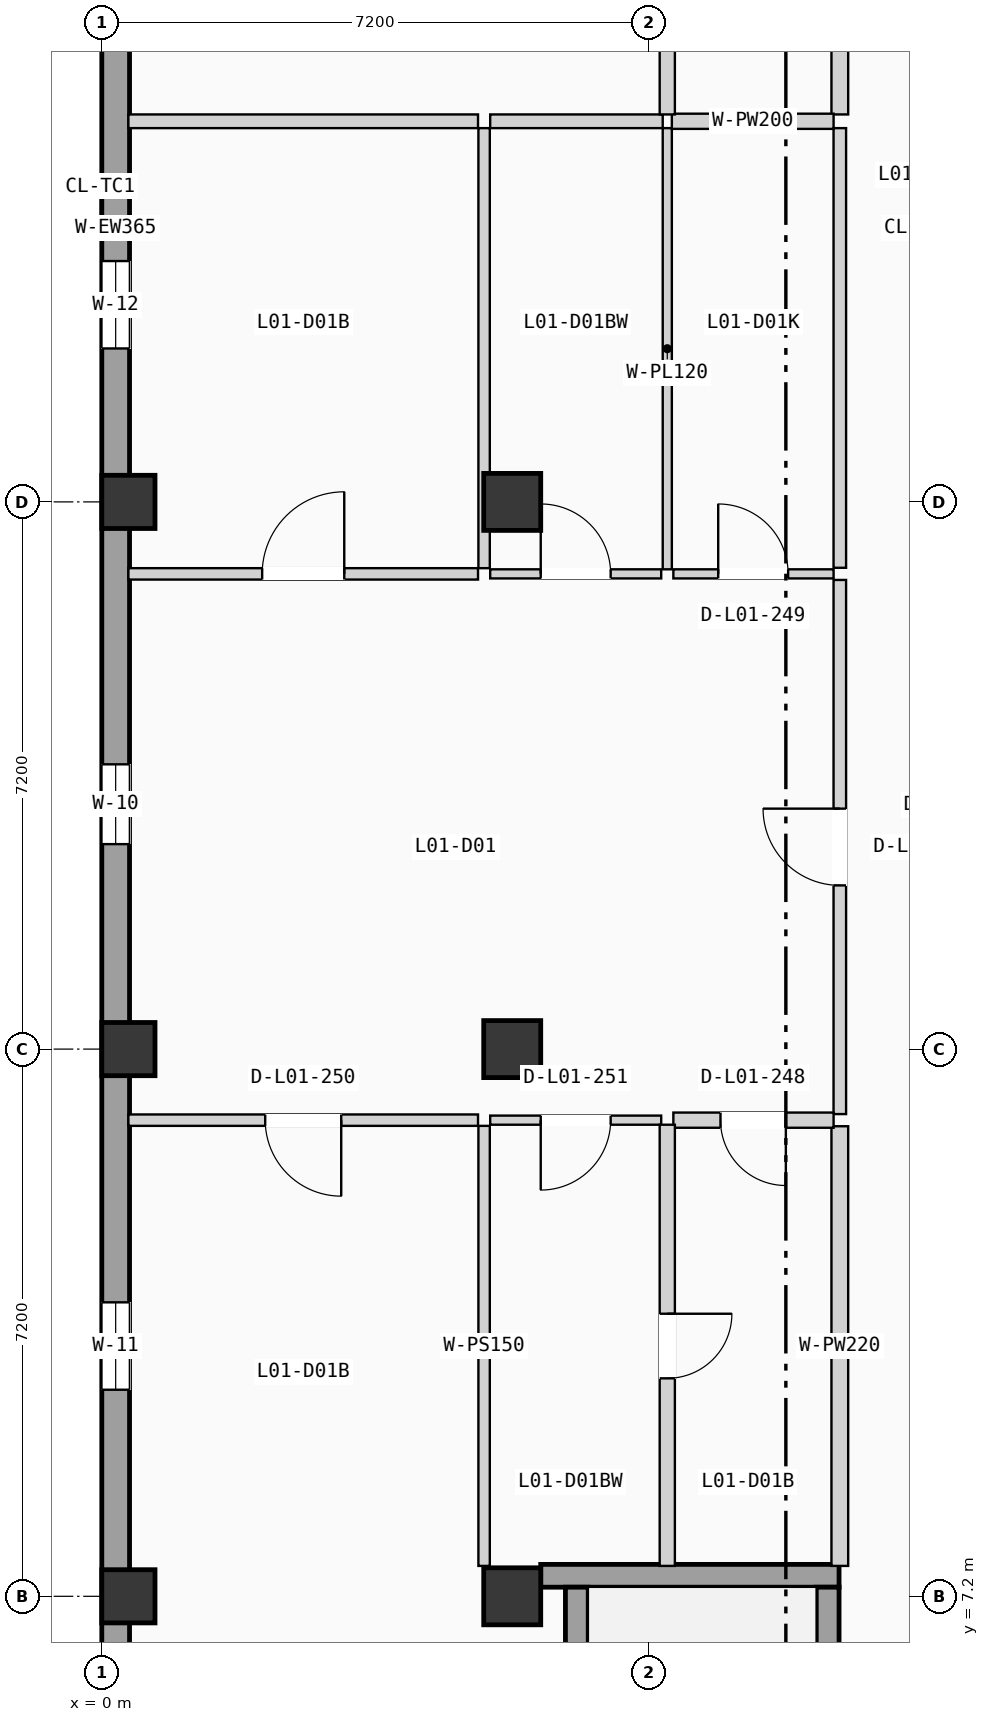
"""IFC4 building model, lengths in metres.
Left out: names, types, materials, properties, quantities, classifications, styles, units other than length and angle.
Written with IfcOpenShell. Run it as: python <this file> out.ifc"""

import sys

from ifc_helpers import new_model, si_unit, direction, frame, frame_2d, origin, origin_2d, place, context, subcontext, project, spatial, rectangle, extrude, element, fill, save


model = new_model("IFC4")
c1 = context("Model", 3, precision=1e-05, world=origin(), true_north=direction((0.0, 1.0)))
c2 = subcontext(c1, "Body", "Model", "MODEL_VIEW")
j1 = project(units=[si_unit("LENGTHUNIT", "METRE"), si_unit("PLANEANGLEUNIT", "RADIAN")], contexts=[c1])
p1 = place(None, origin())
s1 = spatial("IfcSite", under=j1, at=p1, CompositionType="ELEMENT")
p2 = place(p1, origin())
s2 = spatial("IfcBuilding", under=s1, at=p2, CompositionType="ELEMENT")
p3 = place(p2, frame((0.0, 0.0, 4.9)))
s3 = spatial("IfcBuildingStorey", under=s2, at=p3, CompositionType="ELEMENT", Elevation=4.9)
for number, where, z_axis, x_axis in (
    (1, (0.35, 7.2, 0.0), (0.0, 0.0, 1.0), (1.0, 0.0, 0.0)),
    (2, (0.35, 14.4, 0.0), (0.0, 0.0, 1.0), (1.0, 0.0, 0.0)),
    (3, (0.35, 21.6, 0.0), (0.0, 0.0, 1.0), (1.0, 0.0, 0.0)),
):
    element("IfcColumn", number, at=place(p3, frame(where, z_axis=z_axis, x_axis=x_axis)), inside=s3, PredefinedType="COLUMN", context=c2, shape_type="SweptSolid", body=[
        extrude(rectangle(XDim=0.7, YDim=0.7, at=origin_2d()), origin(), (0.0, 0.0, 1.0), 3.675),
    ])
for number, where, z_axis, x_axis in (
    (4, (5.4, 7.2, 0.0), (0.0, 0.0, 1.0), (1.0, 0.0, 0.0)),
    (5, (5.4, 14.4, 0.0), (0.0, 0.0, 1.0), (1.0, 0.0, 0.0)),
    (6, (5.4, 21.6, 0.0), (0.0, 0.0, 1.0), (1.0, 0.0, 0.0)),
):
    element("IfcColumn", number, at=place(p3, frame(where, z_axis=z_axis, x_axis=x_axis)), inside=s3, PredefinedType="COLUMN", context=c2, shape_type="SweptSolid", body=[
        extrude(rectangle(XDim=0.75, YDim=0.75, at=origin_2d()), origin(), (0.0, 0.0, 1.0), 3.675),
    ])
p4 = place(p3, frame((0.183, 0.365, 0.0), z_axis=(0.0, 0.0, 1.0), x_axis=(0.0, 1.0, 0.0)))
e7 = element("IfcWall", 7, at=p4, inside=s3, PredefinedType="SOLIDWALL", context=c2, shape_type="SweptSolid", body=[
    extrude(rectangle(XDim=49.67, YDim=0.365, at=frame_2d((24.835, 0.0))), origin(), (0.0, 0.0, 1.0), 3.415),
])
p5 = place(p4, frame((16.732, 0.0, 0.9)))
e8 = element("IfcOpeningElement", 8, at=p5, cuts=e7, PredefinedType="OPENING", context=c2, shape_type="SweptSolid", body=[
    extrude(rectangle(XDim=1.05, YDim=1.8, at=frame_2d((0.525, 0.9))), frame((0.0, 0.192, 0.0), z_axis=(0.0, -1.0, 0.0), x_axis=(1.0, 0.0, 0.0)), (0.0, 0.0, 1.0), 0.385),
])
p6 = place(p4, frame((9.553, 0.0, 0.9)))
e9 = element("IfcOpeningElement", 9, at=p6, cuts=e7, PredefinedType="OPENING", context=c2, shape_type="SweptSolid", body=[
    extrude(rectangle(XDim=1.15, YDim=1.2, at=frame_2d((0.575, 0.6))), frame((0.0, 0.192, 0.0), z_axis=(0.0, -1.0, 0.0), x_axis=(1.0, 0.0, 0.0)), (0.0, 0.0, 1.0), 0.385),
])
p7 = place(p4, frame((23.254, 0.0, 0.9)))
e10 = element("IfcOpeningElement", 10, at=p7, cuts=e7, PredefinedType="OPENING", context=c2, shape_type="SweptSolid", body=[
    extrude(rectangle(XDim=1.15, YDim=1.35, at=frame_2d((0.575, 0.675))), frame((0.0, 0.192, 0.0), z_axis=(0.0, -1.0, 0.0), x_axis=(1.0, 0.0, 0.0)), (0.0, 0.0, 1.0), 0.385),
])
p8 = place(p4, frame((32.81, 0.0, 0.9)))
e11 = element("IfcOpeningElement", 11, at=p8, cuts=e7, PredefinedType="OPENING", context=c2, shape_type="SweptSolid", body=[
    extrude(rectangle(XDim=1.15, YDim=1.5, at=frame_2d((0.575, 0.75))), frame((0.0, 0.192, 0.0), z_axis=(0.0, -1.0, 0.0), x_axis=(1.0, 0.0, 0.0)), (0.0, 0.0, 1.0), 0.385),
])
p9 = place(p4, frame((29.4, 0.0, 0.9)))
e12 = element("IfcOpeningElement", 12, at=p9, cuts=e7, PredefinedType="OPENING", context=c2, shape_type="SweptSolid", body=[
    extrude(rectangle(XDim=1.15, YDim=1.65, at=frame_2d((0.575, 0.825))), frame((0.0, 0.192, 0.0), z_axis=(0.0, -1.0, 0.0), x_axis=(1.0, 0.0, 0.0)), (0.0, 0.0, 1.0), 0.385),
])
p10 = place(p4, frame((39.404, 0.0, 0.9)))
e13 = element("IfcOpeningElement", 13, at=p10, cuts=e7, PredefinedType="OPENING", context=c2, shape_type="SweptSolid", body=[
    extrude(rectangle(XDim=1.15, YDim=1.8, at=frame_2d((0.575, 0.9))), frame((0.0, 0.192, 0.0), z_axis=(0.0, -1.0, 0.0), x_axis=(1.0, 0.0, 0.0)), (0.0, 0.0, 1.0), 0.385),
])
p11 = place(p3, frame((5.775, 7.47, 0.0), z_axis=(0.0, 0.0, 1.0), x_axis=(1.0, 0.0, 0.0)))
e14 = element("IfcWall", 14, at=p11, inside=s3, PredefinedType="SHEAR", context=c2, shape_type="SweptSolid", body=[
    extrude(rectangle(XDim=3.925, YDim=0.3, at=frame_2d((1.962, 0.0))), origin(), (0.0, 0.0, 1.0), 3.415),
])
p12 = place(p3, frame((6.25, 0.32, 0.0), z_axis=(0.0, 0.0, 1.0), x_axis=(0.0, 1.0, 0.0)))
e15 = element("IfcWall", 15, at=p12, inside=s3, PredefinedType="SHEAR", context=c2, shape_type="SweptSolid", body=[
    extrude(rectangle(XDim=7.0, YDim=0.3, at=frame_2d((3.5, 0.0))), origin(), (0.0, 0.0, 1.0), 3.415),
])
p13 = place(p3, frame((9.55, 0.32, 0.0), z_axis=(0.0, 0.0, 1.0), x_axis=(0.0, 1.0, 0.0)))
e16 = element("IfcWall", 16, at=p13, inside=s3, PredefinedType="SHEAR", context=c2, shape_type="SweptSolid", body=[
    extrude(rectangle(XDim=7.0, YDim=0.3, at=frame_2d((3.5, 0.0))), origin(), (0.0, 0.0, 1.0), 3.415),
])
p14 = place(p13, frame((0.225, 0.0, 0.0)))
e17 = element("IfcOpeningElement", 17, at=p14, cuts=e16, PredefinedType="OPENING", context=c2, shape_type="SweptSolid", body=[
    extrude(rectangle(XDim=1.15, YDim=2.12, at=frame_2d((0.575, 1.06))), frame((0.0, 0.16, 0.0), z_axis=(0.0, -1.0, 0.0), x_axis=(1.0, 0.0, 0.0)), (0.0, 0.0, 1.0), 0.32),
])
p15 = place(p3, frame((9.71, 13.545, 0.0), z_axis=(0.0, 0.0, 1.0), x_axis=(0.0, 1.0, 0.0)))
e18 = element("IfcWall", 18, at=p15, inside=s3, PredefinedType="PARTITIONING", context=c2, shape_type="SweptSolid", body=[
    extrude(rectangle(XDim=7.028, YDim=0.165, at=frame_2d((3.514, 0.0))), origin(), (0.0, 0.0, 1.0), 3.395),
])
p16 = place(p15, frame((3.009, 0.0, 0.0)))
e19 = element("IfcOpeningElement", 19, at=p16, cuts=e18, PredefinedType="OPENING", context=c2, shape_type="SweptSolid", body=[
    extrude(rectangle(XDim=1.01, YDim=2.11, at=frame_2d((0.505, 1.055))), frame((0.0, 0.093, 0.0), z_axis=(0.0, -1.0, 0.0), x_axis=(1.0, 0.0, 0.0)), (0.0, 0.0, 1.0), 0.185),
])
p17 = place(p3, frame((9.71, 7.6, 0.0), z_axis=(0.0, 0.0, 1.0), x_axis=(0.0, 1.0, 0.0)))
e20 = element("IfcWall", 20, at=p17, inside=s3, PredefinedType="PLUMBINGWALL", context=c2, shape_type="SweptSolid", body=[
    extrude(rectangle(XDim=5.785, YDim=0.22, at=frame_2d((2.893, 0.0))), origin(), (0.0, 0.0, 1.0), 3.395),
])
p18 = place(p3, frame((9.71, 20.733, 0.0), z_axis=(0.0, 0.0, 1.0), x_axis=(0.0, 1.0, 0.0)))
e21 = element("IfcWall", 21, at=p18, inside=s3, PredefinedType="PARTITIONING", context=c2, shape_type="SweptSolid", body=[
    extrude(rectangle(XDim=5.785, YDim=0.165, at=frame_2d((2.893, 0.0))), origin(), (0.0, 0.0, 1.0), 3.395),
])
p19 = place(p3, frame((9.71, 26.698, 0.0), z_axis=(0.0, 0.0, 1.0), x_axis=(0.0, 1.0, 0.0)))
e22 = element("IfcWall", 22, at=p19, inside=s3, PredefinedType="PLUMBINGWALL", context=c2, shape_type="SweptSolid", body=[
    extrude(rectangle(XDim=4.912, YDim=0.22, at=frame_2d((2.456, 0.0))), origin(), (0.0, 0.0, 1.0), 3.395),
])
p20 = place(p3, frame((7.52, 13.465, 0.0), z_axis=(0.0, 0.0, 1.0), x_axis=(1.0, 0.0, 0.0)))
e23 = element("IfcWall", 23, at=p20, inside=s3, PredefinedType="PLUMBINGWALL", context=c2, shape_type="SweptSolid", body=[
    extrude(rectangle(XDim=2.108, YDim=0.2, at=frame_2d((1.054, 0.0))), origin(), (0.0, 0.0, 1.0), 3.395),
])
p21 = place(p20, frame((0.62, 0.0, 0.0)))
e24 = element("IfcOpeningElement", 24, at=p21, cuts=e23, PredefinedType="OPENING", context=c2, shape_type="SweptSolid", body=[
    extrude(rectangle(XDim=0.86, YDim=2.0, at=frame_2d((0.43, 1.0))), frame((0.0, 0.11, 0.0), z_axis=(0.0, -1.0, 0.0), x_axis=(1.0, 0.0, 0.0)), (0.0, 0.0, 1.0), 0.22),
])
p22 = place(p3, frame((7.52, 20.653, 0.0), z_axis=(0.0, 0.0, 1.0), x_axis=(1.0, 0.0, 0.0)))
e25 = element("IfcWall", 25, at=p22, inside=s3, PredefinedType="PARTITIONING", context=c2, shape_type="SweptSolid", body=[
    extrude(rectangle(XDim=2.108, YDim=0.12, at=frame_2d((1.054, 0.0))), origin(), (0.0, 0.0, 1.0), 3.395),
])
p23 = place(p22, frame((0.59, 0.0, 0.0)))
e26 = element("IfcOpeningElement", 26, at=p23, cuts=e25, PredefinedType="OPENING", context=c2, shape_type="SweptSolid", body=[
    extrude(rectangle(XDim=0.92, YDim=2.02, at=frame_2d((0.46, 1.01))), frame((0.0, 0.07, 0.0), z_axis=(0.0, -1.0, 0.0), x_axis=(1.0, 0.0, 0.0)), (0.0, 0.0, 1.0), 0.14),
])
p24 = place(p3, frame((0.35, 13.465, 0.0), z_axis=(0.0, 0.0, 1.0), x_axis=(1.0, 0.0, 0.0)))
e27 = element("IfcWall", 27, at=p24, inside=s3, PredefinedType="PARTITIONING", context=c2, shape_type="SweptSolid", body=[
    extrude(rectangle(XDim=4.6, YDim=0.15, at=frame_2d((2.3, 0.0))), origin(), (0.0, 0.0, 1.0), 3.395),
])
p25 = place(p24, frame((1.8, 0.0, 0.0)))
e28 = element("IfcOpeningElement", 28, at=p25, cuts=e27, PredefinedType="OPENING", context=c2, shape_type="SweptSolid", body=[
    extrude(rectangle(XDim=1.0, YDim=2.06, at=frame_2d((0.5, 1.03))), frame((0.0, 0.085, 0.0), z_axis=(0.0, -1.0, 0.0), x_axis=(1.0, 0.0, 0.0)), (0.0, 0.0, 1.0), 0.17),
])
p26 = place(p3, frame((5.11, 13.465, 0.0), z_axis=(0.0, 0.0, 1.0), x_axis=(1.0, 0.0, 0.0)))
e29 = element("IfcWall", 29, at=p26, inside=s3, PredefinedType="PARTITIONING", context=c2, shape_type="SweptSolid", body=[
    extrude(rectangle(XDim=2.25, YDim=0.12, at=frame_2d((1.125, 0.0))), origin(), (0.0, 0.0, 1.0), 3.395),
])
p27 = place(p26, frame((0.665, 0.0, 0.0)))
e30 = element("IfcOpeningElement", 30, at=p27, cuts=e29, PredefinedType="OPENING", context=c2, shape_type="SweptSolid", body=[
    extrude(rectangle(XDim=0.92, YDim=2.02, at=frame_2d((0.46, 1.01))), frame((0.0, 0.07, 0.0), z_axis=(0.0, -1.0, 0.0), x_axis=(1.0, 0.0, 0.0)), (0.0, 0.0, 1.0), 0.14),
])
p28 = place(p3, frame((0.35, 20.653, 0.0), z_axis=(0.0, 0.0, 1.0), x_axis=(1.0, 0.0, 0.0)))
e31 = element("IfcWall", 31, at=p28, inside=s3, PredefinedType="PARTITIONING", context=c2, shape_type="SweptSolid", body=[
    extrude(rectangle(XDim=4.6, YDim=0.15, at=frame_2d((2.3, 0.0))), origin(), (0.0, 0.0, 1.0), 3.395),
])
p29 = place(p28, frame((1.76, 0.0, 0.0)))
e32 = element("IfcOpeningElement", 32, at=p29, cuts=e31, PredefinedType="OPENING", context=c2, shape_type="SweptSolid", body=[
    extrude(rectangle(XDim=1.08, YDim=2.1, at=frame_2d((0.54, 1.05))), frame((0.0, 0.085, 0.0), z_axis=(0.0, -1.0, 0.0), x_axis=(1.0, 0.0, 0.0)), (0.0, 0.0, 1.0), 0.17),
])
p30 = place(p3, frame((5.11, 20.653, 0.0), z_axis=(0.0, 0.0, 1.0), x_axis=(1.0, 0.0, 0.0)))
e33 = element("IfcWall", 33, at=p30, inside=s3, PredefinedType="PARTITIONING", context=c2, shape_type="SweptSolid", body=[
    extrude(rectangle(XDim=2.25, YDim=0.12, at=frame_2d((1.125, 0.0))), origin(), (0.0, 0.0, 1.0), 3.395),
])
p31 = place(p30, frame((0.665, 0.0, 0.0)))
e34 = element("IfcOpeningElement", 34, at=p31, cuts=e33, PredefinedType="OPENING", context=c2, shape_type="SweptSolid", body=[
    extrude(rectangle(XDim=0.92, YDim=2.02, at=frame_2d((0.46, 1.01))), frame((0.0, 0.07, 0.0), z_axis=(0.0, -1.0, 0.0), x_axis=(1.0, 0.0, 0.0)), (0.0, 0.0, 1.0), 0.14),
])
p32 = place(p3, frame((7.44, 7.6, 0.0), z_axis=(0.0, 0.0, 1.0), x_axis=(0.0, 1.0, 0.0)))
e35 = element("IfcWall", 35, at=p32, inside=s3, PredefinedType="PLUMBINGWALL", context=c2, shape_type="SweptSolid", body=[
    extrude(rectangle(XDim=5.805, YDim=0.2, at=frame_2d((2.902, 0.0))), origin(), (0.0, 0.0, 1.0), 3.395),
])
p33 = place(p32, frame((2.468, 0.0, 0.0)))
e36 = element("IfcOpeningElement", 36, at=p33, cuts=e35, PredefinedType="OPENING", context=c2, shape_type="SweptSolid", body=[
    extrude(rectangle(XDim=0.85, YDim=2.01, at=frame_2d((0.425, 1.005))), frame((0.0, 0.11, 0.0), z_axis=(0.0, -1.0, 0.0), x_axis=(1.0, 0.0, 0.0)), (0.0, 0.0, 1.0), 0.22),
])
p34 = place(p3, frame((7.44, 20.713, 0.0), z_axis=(0.0, 0.0, 1.0), x_axis=(0.0, 1.0, 0.0)))
e37 = element("IfcWall", 37, at=p34, inside=s3, PredefinedType="PARTITIONING", context=c2, shape_type="SweptSolid", body=[
    extrude(rectangle(XDim=5.805, YDim=0.12, at=frame_2d((2.903, 0.0))), origin(), (0.0, 0.0, 1.0), 3.395),
])
p35 = place(p3, frame((7.5, 26.608, 0.0), z_axis=(0.0, 0.0, 1.0), x_axis=(1.0, 0.0, 0.0)))
e38 = element("IfcWall", 38, at=p35, inside=s3, PredefinedType="PLUMBINGWALL", context=c2, shape_type="SweptSolid", body=[
    extrude(rectangle(XDim=2.128, YDim=0.2, at=frame_2d((1.064, 0.0))), origin(), (0.0, 0.0, 1.0), 3.395),
])
p36 = place(p3, frame((5.03, 7.6, 0.0), z_axis=(0.0, 0.0, 1.0), x_axis=(0.0, 1.0, 0.0)))
e39 = element("IfcWall", 39, at=p36, inside=s3, PredefinedType="PARTITIONING", context=c2, shape_type="SweptSolid", body=[
    extrude(rectangle(XDim=5.79, YDim=0.15, at=frame_2d((2.895, 0.0))), origin(), (0.0, 0.0, 1.0), 3.395),
])
p37 = place(p3, frame((5.03, 20.728, 0.0), z_axis=(0.0, 0.0, 1.0), x_axis=(0.0, 1.0, 0.0)))
e40 = element("IfcWall", 40, at=p37, inside=s3, PredefinedType="PARTITIONING", context=c2, shape_type="SweptSolid", body=[
    extrude(rectangle(XDim=5.79, YDim=0.15, at=frame_2d((2.895, 0.0))), origin(), (0.0, 0.0, 1.0), 3.395),
])
p38 = place(p3, frame((0.35, 26.608, 0.0), z_axis=(0.0, 0.0, 1.0), x_axis=(1.0, 0.0, 0.0)))
e41 = element("IfcWall", 41, at=p38, inside=s3, PredefinedType="PARTITIONING", context=c2, shape_type="SweptSolid", body=[
    extrude(rectangle(XDim=4.6, YDim=0.18, at=frame_2d((2.3, 0.0))), origin(), (0.0, 0.0, 1.0), 3.395),
])
p39 = place(p3, frame((5.11, 26.608, 0.0), z_axis=(0.0, 0.0, 1.0), x_axis=(1.0, 0.0, 0.0)))
e42 = element("IfcWall", 42, at=p39, inside=s3, PredefinedType="PARTITIONING", context=c2, shape_type="SweptSolid", body=[
    extrude(rectangle(XDim=2.27, YDim=0.18, at=frame_2d((1.135, 0.0))), origin(), (0.0, 0.0, 1.0), 3.395),
])
p40 = place(p3, frame((7.44, 26.698, 0.0), z_axis=(0.0, 0.0, 1.0), x_axis=(0.0, 1.0, 0.0)))
e43 = element("IfcWall", 43, at=p40, inside=s3, PredefinedType="PLUMBINGWALL", context=c2, shape_type="SweptSolid", body=[
    extrude(rectangle(XDim=4.917, YDim=0.2, at=frame_2d((2.458, 0.0))), origin(), (0.0, 0.0, 1.0), 3.395),
])
p41 = place(p5, origin())
e44 = element("IfcWindow", 44, at=p41, inside=s3, PartitioningType="SINGLE_PANEL", PredefinedType="WINDOW", context=c2, shape_type="SweptSolid", body=[
    extrude(rectangle(XDim=1.05, YDim=1.8, at=frame_2d((0.525, 0.9))), frame((0.0, 0.03, 0.0), z_axis=(0.0, -1.0, 0.0), x_axis=(1.0, 0.0, 0.0)), (0.0, 0.0, 1.0), 0.06),
])
fill(e8, e44)
p42 = place(p6, origin())
e45 = element("IfcWindow", 45, at=p42, inside=s3, PartitioningType="SINGLE_PANEL", PredefinedType="WINDOW", context=c2, shape_type="SweptSolid", body=[
    extrude(rectangle(XDim=1.15, YDim=1.2, at=frame_2d((0.575, 0.6))), frame((0.0, 0.03, 0.0), z_axis=(0.0, -1.0, 0.0), x_axis=(1.0, 0.0, 0.0)), (0.0, 0.0, 1.0), 0.06),
])
fill(e9, e45)
p43 = place(p7, origin())
e46 = element("IfcWindow", 46, at=p43, inside=s3, PartitioningType="SINGLE_PANEL", PredefinedType="WINDOW", context=c2, shape_type="SweptSolid", body=[
    extrude(rectangle(XDim=1.15, YDim=1.35, at=frame_2d((0.575, 0.675))), frame((0.0, 0.03, 0.0), z_axis=(0.0, -1.0, 0.0), x_axis=(1.0, 0.0, 0.0)), (0.0, 0.0, 1.0), 0.06),
])
fill(e10, e46)
p44 = place(p16, origin())
e47 = element("IfcDoor", 47, at=p44, inside=s3, OperationType="SINGLE_SWING_RIGHT", PredefinedType="DOOR", context=c2, shape_type="SweptSolid", body=[
    extrude(rectangle(XDim=1.01, YDim=2.11, at=frame_2d((0.505, 1.055))), frame((0.0, 0.025, 0.0), z_axis=(0.0, -1.0, 0.0), x_axis=(1.0, 0.0, 0.0)), (0.0, 0.0, 1.0), 0.05),
])
fill(e19, e47)
p45 = place(p21, frame((0.86, 0.0, 0.0), z_axis=(0.0, 0.0, 1.0), x_axis=(-1.0, 0.0, 0.0)))
e48 = element("IfcDoor", 48, at=p45, inside=s3, OperationType="SINGLE_SWING_RIGHT", PredefinedType="DOOR", context=c2, shape_type="SweptSolid", body=[
    extrude(rectangle(XDim=0.86, YDim=2.0, at=frame_2d((0.43, 1.0))), frame((0.0, 0.025, 0.0), z_axis=(0.0, -1.0, 0.0), x_axis=(1.0, 0.0, 0.0)), (0.0, 0.0, 1.0), 0.05),
])
fill(e24, e48)
p46 = place(p23, origin())
e49 = element("IfcDoor", 49, at=p46, inside=s3, OperationType="SINGLE_SWING_LEFT", PredefinedType="DOOR", context=c2, shape_type="SweptSolid", body=[
    extrude(rectangle(XDim=0.92, YDim=2.02, at=frame_2d((0.46, 1.01))), frame((0.0, 0.025, 0.0), z_axis=(0.0, -1.0, 0.0), x_axis=(1.0, 0.0, 0.0)), (0.0, 0.0, 1.0), 0.05),
])
fill(e26, e49)
p47 = place(p25, frame((1.0, 0.0, 0.0), z_axis=(0.0, 0.0, 1.0), x_axis=(-1.0, 0.0, 0.0)))
e50 = element("IfcDoor", 50, at=p47, inside=s3, OperationType="SINGLE_SWING_RIGHT", PredefinedType="DOOR", context=c2, shape_type="SweptSolid", body=[
    extrude(rectangle(XDim=1.0, YDim=2.06, at=frame_2d((0.5, 1.03))), frame((0.0, 0.025, 0.0), z_axis=(0.0, -1.0, 0.0), x_axis=(1.0, 0.0, 0.0)), (0.0, 0.0, 1.0), 0.05),
])
fill(e28, e50)
p48 = place(p27, frame((0.92, 0.0, 0.0), z_axis=(0.0, 0.0, 1.0), x_axis=(-1.0, 0.0, 0.0)))
e51 = element("IfcDoor", 51, at=p48, inside=s3, OperationType="SINGLE_SWING_LEFT", PredefinedType="DOOR", context=c2, shape_type="SweptSolid", body=[
    extrude(rectangle(XDim=0.92, YDim=2.02, at=frame_2d((0.46, 1.01))), frame((0.0, 0.025, 0.0), z_axis=(0.0, -1.0, 0.0), x_axis=(1.0, 0.0, 0.0)), (0.0, 0.0, 1.0), 0.05),
])
fill(e30, e51)
p49 = place(p29, origin())
e52 = element("IfcDoor", 52, at=p49, inside=s3, OperationType="SINGLE_SWING_RIGHT", PredefinedType="DOOR", context=c2, shape_type="SweptSolid", body=[
    extrude(rectangle(XDim=1.08, YDim=2.1, at=frame_2d((0.54, 1.05))), frame((0.0, 0.025, 0.0), z_axis=(0.0, -1.0, 0.0), x_axis=(1.0, 0.0, 0.0)), (0.0, 0.0, 1.0), 0.05),
])
fill(e32, e52)
p50 = place(p31, origin())
e53 = element("IfcDoor", 53, at=p50, inside=s3, OperationType="SINGLE_SWING_LEFT", PredefinedType="DOOR", context=c2, shape_type="SweptSolid", body=[
    extrude(rectangle(XDim=0.92, YDim=2.02, at=frame_2d((0.46, 1.01))), frame((0.0, 0.025, 0.0), z_axis=(0.0, -1.0, 0.0), x_axis=(1.0, 0.0, 0.0)), (0.0, 0.0, 1.0), 0.05),
])
fill(e34, e53)
p51 = place(p33, frame((0.85, 0.0, 0.0), z_axis=(0.0, 0.0, 1.0), x_axis=(-1.0, 0.0, 0.0)))
e54 = element("IfcDoor", 54, at=p51, inside=s3, OperationType="SINGLE_SWING_RIGHT", PredefinedType="DOOR", context=c2, shape_type="SweptSolid", body=[
    extrude(rectangle(XDim=0.85, YDim=2.01, at=frame_2d((0.425, 1.005))), frame((0.0, 0.025, 0.0), z_axis=(0.0, -1.0, 0.0), x_axis=(1.0, 0.0, 0.0)), (0.0, 0.0, 1.0), 0.05),
])
fill(e36, e54)
save(model, sys.argv[1])
